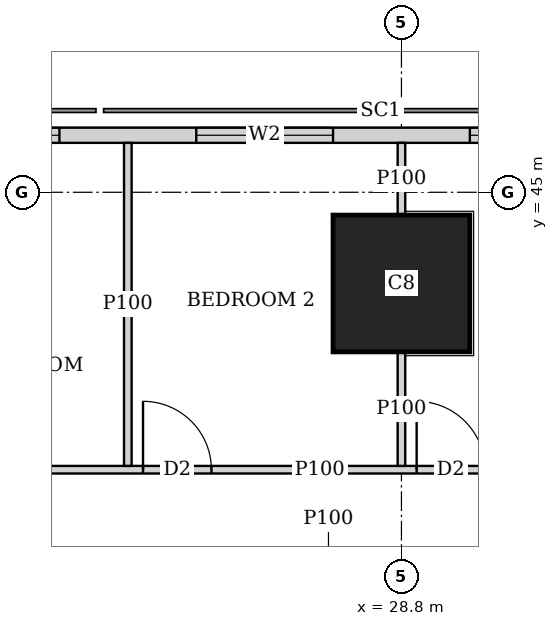
"""IFC4 building model, lengths in metres.
Left out: names, types, materials, properties, quantities, classifications, styles, units other than length and angle.
Written with IfcOpenShell. Run it as: python <this file> out.ifc"""

import sys

from ifc_helpers import new_model, si_unit, direction, frame, frame_2d, origin, origin_2d, place, context, subcontext, project, spatial, rectangle, extrude, element, fill, save


model = new_model("IFC4")
c1 = context("Model", 3, precision=1e-05, world=origin(), true_north=direction((0.0, 1.0)))
c2 = subcontext(c1, "Body", "Model", "MODEL_VIEW")
j1 = project(units=[si_unit("LENGTHUNIT", "METRE"), si_unit("PLANEANGLEUNIT", "RADIAN")], contexts=[c1])
p1 = place(None, origin())
s1 = spatial("IfcSite", under=j1, at=p1, CompositionType="ELEMENT")
p2 = place(p1, origin())
s2 = spatial("IfcBuilding", under=s1, at=p2, CompositionType="ELEMENT")
p3 = place(p2, frame((0.0, 0.0, 139.55)))
s3 = spatial("IfcBuildingStorey", under=s2, at=p3, CompositionType="ELEMENT", Elevation=139.55)
p4 = place(p3, frame((28.8, 43.8, 0.0), z_axis=(0.0, 0.0, 1.0), x_axis=(1.0, 0.0, 0.0)))
e1 = element("IfcColumn", 1, at=p4, inside=s3, PredefinedType="COLUMN", context=c2, shape_type="SweptSolid", body=[
    extrude(rectangle(XDim=1.8, YDim=1.8, at=origin_2d()), origin(), (0.0, 0.0, 1.0), 3.75),
])
p5 = place(p3, frame((40.106, 45.75, 0.0), z_axis=(0.0, 0.0, 1.0), x_axis=(-1.0, 0.0, 0.0)))
e2 = element("IfcWall", 2, at=p5, inside=s3, PredefinedType="SOLIDWALL", context=c2, shape_type="SweptSolid", body=[
    extrude(rectangle(XDim=37.943, YDim=0.2, at=frame_2d((18.971, 0.0))), origin(), (0.0, 0.0, 1.0), 3.5),
])
p6 = place(p5, frame((8.606, 0.0, 0.9)))
e3 = element("IfcOpeningElement", 3, at=p6, cuts=e2, PredefinedType="OPENING", context=c2, shape_type="SweptSolid", body=[
    extrude(rectangle(XDim=1.8, YDim=1.5, at=frame_2d((0.9, 0.75))), frame((0.0, 0.11, 0.0), z_axis=(0.0, -1.0, 0.0), x_axis=(1.0, 0.0, 0.0)), (0.0, 0.0, 1.0), 0.22),
])
p7 = place(p5, frame((12.206, 0.0, 0.9)))
e4 = element("IfcOpeningElement", 4, at=p7, cuts=e2, PredefinedType="OPENING", context=c2, shape_type="SweptSolid", body=[
    extrude(rectangle(XDim=1.8, YDim=1.5, at=frame_2d((0.9, 0.75))), frame((0.0, 0.11, 0.0), z_axis=(0.0, -1.0, 0.0), x_axis=(1.0, 0.0, 0.0)), (0.0, 0.0, 1.0), 0.22),
])
p8 = place(p5, frame((15.806, 0.0, 0.9)))
e5 = element("IfcOpeningElement", 5, at=p8, cuts=e2, PredefinedType="OPENING", context=c2, shape_type="SweptSolid", body=[
    extrude(rectangle(XDim=1.8, YDim=1.5, at=frame_2d((0.9, 0.75))), frame((0.0, 0.11, 0.0), z_axis=(0.0, -1.0, 0.0), x_axis=(1.0, 0.0, 0.0)), (0.0, 0.0, 1.0), 0.22),
])
p9 = place(p5, frame((19.406, 0.0, 0.9)))
e6 = element("IfcOpeningElement", 6, at=p9, cuts=e2, PredefinedType="OPENING", context=c2, shape_type="SweptSolid", body=[
    extrude(rectangle(XDim=1.8, YDim=1.5, at=frame_2d((0.9, 0.75))), frame((0.0, 0.11, 0.0), z_axis=(0.0, -1.0, 0.0), x_axis=(1.0, 0.0, 0.0)), (0.0, 0.0, 1.0), 0.22),
])
p10 = place(p5, frame((23.006, 0.0, 0.9)))
e7 = element("IfcOpeningElement", 7, at=p10, cuts=e2, PredefinedType="OPENING", context=c2, shape_type="SweptSolid", body=[
    extrude(rectangle(XDim=1.8, YDim=1.5, at=frame_2d((0.9, 0.75))), frame((0.0, 0.11, 0.0), z_axis=(0.0, -1.0, 0.0), x_axis=(1.0, 0.0, 0.0)), (0.0, 0.0, 1.0), 0.22),
])
p11 = place(p5, frame((26.606, 0.0, 0.9)))
e8 = element("IfcOpeningElement", 8, at=p11, cuts=e2, PredefinedType="OPENING", context=c2, shape_type="SweptSolid", body=[
    extrude(rectangle(XDim=1.8, YDim=1.5, at=frame_2d((0.9, 0.75))), frame((0.0, 0.11, 0.0), z_axis=(0.0, -1.0, 0.0), x_axis=(1.0, 0.0, 0.0)), (0.0, 0.0, 1.0), 0.22),
])
p12 = place(p3, frame((21.6, 41.35, 0.0), z_axis=(0.0, 0.0, 1.0), x_axis=(1.0, 0.0, 0.0)))
e9 = element("IfcWall", 9, at=p12, inside=s3, PredefinedType="PARTITIONING", context=c2, shape_type="SweptSolid", body=[
    extrude(rectangle(XDim=12.253, YDim=0.1, at=frame_2d((6.126, 0.0))), origin(), (0.0, 0.0, 1.0), 3.5),
])
p13 = place(p12, frame((0.2, 0.0, 0.0)))
e10 = element("IfcOpeningElement", 10, at=p13, cuts=e9, PredefinedType="OPENING", context=c2, shape_type="SweptSolid", body=[
    extrude(rectangle(XDim=0.9, YDim=2.1, at=frame_2d((0.45, 1.05))), frame((0.0, 0.06, 0.0), z_axis=(0.0, -1.0, 0.0), x_axis=(1.0, 0.0, 0.0)), (0.0, 0.0, 1.0), 0.12),
])
p14 = place(p12, frame((3.8, 0.0, 0.0)))
e11 = element("IfcOpeningElement", 11, at=p14, cuts=e9, PredefinedType="OPENING", context=c2, shape_type="SweptSolid", body=[
    extrude(rectangle(XDim=0.9, YDim=2.1, at=frame_2d((0.45, 1.05))), frame((0.0, 0.06, 0.0), z_axis=(0.0, -1.0, 0.0), x_axis=(1.0, 0.0, 0.0)), (0.0, 0.0, 1.0), 0.12),
])
p15 = place(p12, frame((7.4, 0.0, 0.0)))
e12 = element("IfcOpeningElement", 12, at=p15, cuts=e9, PredefinedType="OPENING", context=c2, shape_type="SweptSolid", body=[
    extrude(rectangle(XDim=0.9, YDim=2.1, at=frame_2d((0.45, 1.05))), frame((0.0, 0.06, 0.0), z_axis=(0.0, -1.0, 0.0), x_axis=(1.0, 0.0, 0.0)), (0.0, 0.0, 1.0), 0.12),
])
p16 = place(p3, frame((25.2, 41.4, 0.0), z_axis=(0.0, 0.0, 1.0), x_axis=(0.0, 1.0, 0.0)))
e13 = element("IfcWall", 13, at=p16, inside=s3, PredefinedType="PARTITIONING", context=c2, shape_type="SweptSolid", body=[
    extrude(rectangle(XDim=4.25, YDim=0.1, at=frame_2d((2.125, 0.0))), origin(), (0.0, 0.0, 1.0), 2.1),
])
p17 = place(p3, frame((28.8, 41.4, 0.0), z_axis=(0.0, 0.0, 1.0), x_axis=(0.0, 1.0, 0.0)))
e14 = element("IfcWall", 14, at=p17, inside=s3, PredefinedType="PARTITIONING", context=c2, shape_type="SweptSolid", body=[
    extrude(rectangle(XDim=1.499, YDim=0.1, at=frame_2d((0.75, 0.0))), origin(), (0.0, 0.0, 1.0), 3.5),
])
p18 = place(p3, frame((28.8, 44.701, 0.0), z_axis=(0.0, 0.0, 1.0), x_axis=(0.0, 1.0, 0.0)))
e15 = element("IfcWall", 15, at=p18, inside=s3, PredefinedType="PARTITIONING", context=c2, shape_type="SweptSolid", body=[
    extrude(rectangle(XDim=0.949, YDim=0.1, at=frame_2d((0.475, 0.0))), origin(), (0.0, 0.0, 1.0), 3.5),
])
p19 = place(p6, origin())
e16 = element("IfcWindow", 16, at=p19, inside=s3, PartitioningType="SINGLE_PANEL", PredefinedType="WINDOW", context=c2, shape_type="SweptSolid", body=[
    extrude(rectangle(XDim=1.8, YDim=1.5, at=frame_2d((0.9, 0.75))), frame((0.0, 0.03, 0.0), z_axis=(0.0, -1.0, 0.0), x_axis=(1.0, 0.0, 0.0)), (0.0, 0.0, 1.0), 0.06),
])
fill(e3, e16)
p20 = place(p7, origin())
e17 = element("IfcWindow", 17, at=p20, inside=s3, PartitioningType="SINGLE_PANEL", PredefinedType="WINDOW", context=c2, shape_type="SweptSolid", body=[
    extrude(rectangle(XDim=1.8, YDim=1.5, at=frame_2d((0.9, 0.75))), frame((0.0, 0.03, 0.0), z_axis=(0.0, -1.0, 0.0), x_axis=(1.0, 0.0, 0.0)), (0.0, 0.0, 1.0), 0.06),
])
fill(e4, e17)
p21 = place(p8, origin())
e18 = element("IfcWindow", 18, at=p21, inside=s3, PartitioningType="SINGLE_PANEL", PredefinedType="WINDOW", context=c2, shape_type="SweptSolid", body=[
    extrude(rectangle(XDim=1.8, YDim=1.5, at=frame_2d((0.9, 0.75))), frame((0.0, 0.03, 0.0), z_axis=(0.0, -1.0, 0.0), x_axis=(1.0, 0.0, 0.0)), (0.0, 0.0, 1.0), 0.06),
])
fill(e5, e18)
p22 = place(p14, origin())
e19 = element("IfcDoor", 19, at=p22, inside=s3, OperationType="SINGLE_SWING_LEFT", PredefinedType="DOOR", context=c2, shape_type="SweptSolid", body=[
    extrude(rectangle(XDim=0.9, YDim=2.1, at=frame_2d((0.45, 1.05))), frame((0.0, 0.025, 0.0), z_axis=(0.0, -1.0, 0.0), x_axis=(1.0, 0.0, 0.0)), (0.0, 0.0, 1.0), 0.05),
])
fill(e11, e19)
p23 = place(p15, origin())
e20 = element("IfcDoor", 20, at=p23, inside=s3, OperationType="SINGLE_SWING_LEFT", PredefinedType="DOOR", context=c2, shape_type="SweptSolid", body=[
    extrude(rectangle(XDim=0.9, YDim=2.1, at=frame_2d((0.45, 1.05))), frame((0.0, 0.025, 0.0), z_axis=(0.0, -1.0, 0.0), x_axis=(1.0, 0.0, 0.0)), (0.0, 0.0, 1.0), 0.05),
])
fill(e12, e20)
save(model, sys.argv[1])
